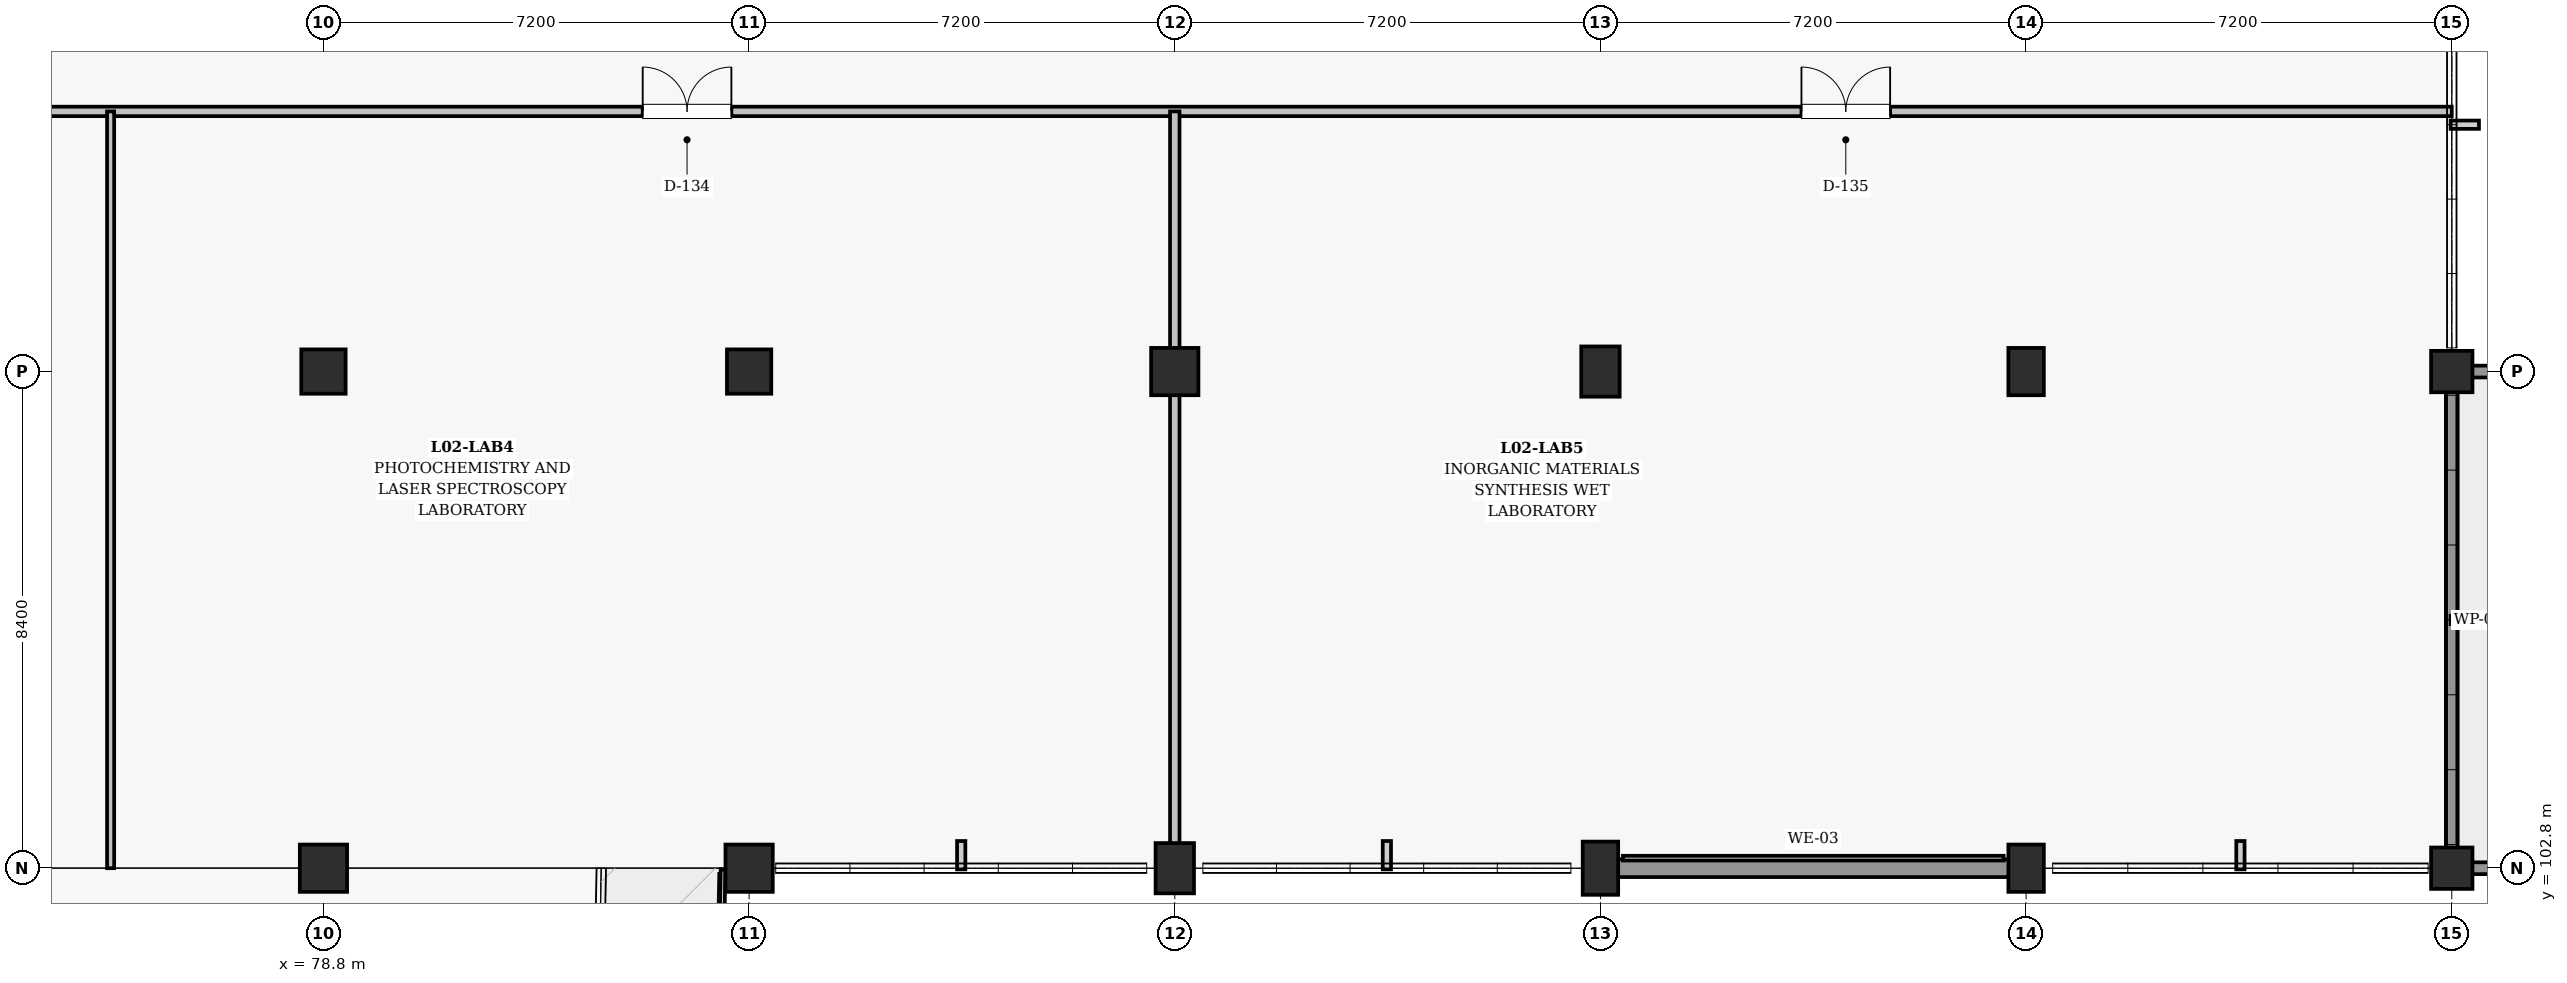
"""IFC4 building model, lengths in metres.
Left out: names, types, materials, properties, quantities, classifications, styles, units other than length and angle.
Written with IfcOpenShell. Run it as: python <this file> out.ifc"""

import sys

from ifc_helpers import new_model, si_unit, direction, frame, frame_2d, origin, origin_2d, place, context, subcontext, project, spatial, rectangle, extrude, element, fill, save


model = new_model("IFC4")
c1 = context("Model", 3, precision=1e-05, world=origin(), true_north=direction((0.0, 1.0)))
c2 = subcontext(c1, "Body", "Model", "MODEL_VIEW")
j1 = project(units=[si_unit("LENGTHUNIT", "METRE"), si_unit("PLANEANGLEUNIT", "RADIAN")], contexts=[c1])
p1 = place(None, origin())
s1 = spatial("IfcSite", under=j1, at=p1, CompositionType="ELEMENT")
p2 = place(p1, origin())
s2 = spatial("IfcBuilding", under=s1, at=p2, CompositionType="ELEMENT")
p3 = place(p2, frame((0.0, 0.0, 9.9)))
s3 = spatial("IfcBuildingStorey", under=s2, at=p3, CompositionType="ELEMENT", Elevation=9.9)
p4 = place(p3, frame((78.8, 102.8, 0.0), z_axis=(0.0, 0.0, 1.0), x_axis=(1.0, 0.0, 0.0)))
e1 = element("IfcColumn", 1, at=p4, inside=s3, PredefinedType="COLUMN", context=c2, shape_type="SweptSolid", body=[
    extrude(rectangle(XDim=0.8, YDim=0.8, at=origin_2d()), origin(), (0.0, 0.0, 1.0), 4.5),
])
p5 = place(p3, frame((78.8, 111.2, 0.0), z_axis=(0.0, 0.0, 1.0), x_axis=(1.0, 0.0, 0.0)))
e2 = element("IfcColumn", 2, at=p5, inside=s3, PredefinedType="COLUMN", context=c2, shape_type="SweptSolid", body=[
    extrude(rectangle(XDim=0.75, YDim=0.75, at=origin_2d()), origin(), (0.0, 0.0, 1.0), 4.5),
])
p6 = place(p3, frame((86.0, 102.8, 0.0), z_axis=(0.0, 0.0, 1.0), x_axis=(1.0, 0.0, 0.0)))
e3 = element("IfcColumn", 3, at=p6, inside=s3, PredefinedType="COLUMN", context=c2, shape_type="SweptSolid", body=[
    extrude(rectangle(XDim=0.8, YDim=0.8, at=origin_2d()), origin(), (0.0, 0.0, 1.0), 4.5),
])
p7 = place(p3, frame((86.0, 111.2, 0.0), z_axis=(0.0, 0.0, 1.0), x_axis=(1.0, 0.0, 0.0)))
e4 = element("IfcColumn", 4, at=p7, inside=s3, PredefinedType="COLUMN", context=c2, shape_type="SweptSolid", body=[
    extrude(rectangle(XDim=0.75, YDim=0.75, at=origin_2d()), origin(), (0.0, 0.0, 1.0), 4.5),
])
p8 = place(p3, frame((93.2, 102.8, 0.0), z_axis=(0.0, 0.0, 1.0), x_axis=(1.0, 0.0, 0.0)))
e5 = element("IfcColumn", 5, at=p8, inside=s3, PredefinedType="COLUMN", context=c2, shape_type="SweptSolid", body=[
    extrude(rectangle(XDim=0.65, YDim=0.85, at=origin_2d()), origin(), (0.0, 0.0, 1.0), 4.5),
])
p9 = place(p3, frame((93.2, 111.2, 0.0), z_axis=(0.0, 0.0, 1.0), x_axis=(1.0, 0.0, 0.0)))
e6 = element("IfcColumn", 6, at=p9, inside=s3, PredefinedType="COLUMN", context=c2, shape_type="SweptSolid", body=[
    extrude(rectangle(XDim=0.8, YDim=0.8, at=origin_2d()), origin(), (0.0, 0.0, 1.0), 4.5),
])
p10 = place(p3, frame((100.4, 102.8, 0.0), z_axis=(0.0, 0.0, 1.0), x_axis=(1.0, 0.0, 0.0)))
e7 = element("IfcColumn", 7, at=p10, inside=s3, PredefinedType="COLUMN", context=c2, shape_type="SweptSolid", body=[
    extrude(rectangle(XDim=0.6, YDim=0.9, at=origin_2d()), origin(), (0.0, 0.0, 1.0), 4.5),
])
p11 = place(p3, frame((100.4, 111.2, 0.0), z_axis=(0.0, 0.0, 1.0), x_axis=(1.0, 0.0, 0.0)))
e8 = element("IfcColumn", 8, at=p11, inside=s3, PredefinedType="COLUMN", context=c2, shape_type="SweptSolid", body=[
    extrude(rectangle(XDim=0.65, YDim=0.85, at=origin_2d()), origin(), (0.0, 0.0, 1.0), 4.5),
])
for number, where, z_axis, x_axis in (
    (9, (107.6, 102.8, 0.0), (0.0, 0.0, 1.0), (1.0, 0.0, 0.0)),
    (10, (107.6, 111.2, 0.0), (0.0, 0.0, 1.0), (1.0, 0.0, 0.0)),
):
    element("IfcColumn", number, at=place(p3, frame(where, z_axis=z_axis, x_axis=x_axis)), inside=s3, PredefinedType="COLUMN", context=c2, shape_type="SweptSolid", body=[
        extrude(rectangle(XDim=0.6, YDim=0.8, at=origin_2d()), origin(), (0.0, 0.0, 1.0), 4.5),
    ])
for number, where, z_axis, x_axis in (
    (11, (114.8, 102.8, 0.0), (0.0, 0.0, 1.0), (1.0, 0.0, 0.0)),
    (12, (114.8, 111.2, 0.0), (0.0, 0.0, 1.0), (1.0, 0.0, 0.0)),
):
    element("IfcColumn", number, at=place(p3, frame(where, z_axis=z_axis, x_axis=x_axis)), inside=s3, PredefinedType="COLUMN", context=c2, shape_type="SweptSolid", body=[
        extrude(rectangle(XDim=0.7, YDim=0.7, at=origin_2d()), origin(), (0.0, 0.0, 1.0), 4.5),
    ])
p12 = place(p3, frame((100.68, 102.8, 0.0), z_axis=(0.0, 0.0, 1.0), x_axis=(1.0, 0.0, 0.0)))
e13 = element("IfcWall", 13, at=p12, inside=s3, PredefinedType="SOLIDWALL", context=c2, shape_type="SweptSolid", body=[
    extrude(rectangle(XDim=6.64, YDim=0.3, at=frame_2d((3.32, 0.0))), origin(), (0.0, 0.0, 1.0), 2.955),
])
for number, where, z_axis, x_axis in (
    (14, (114.8, 102.8, 0.0), (0.0, 0.0, 1.0), (1.0, 0.0, 0.0)),
    (15, (182.0, 111.2, 0.0), (0.0, 0.0, 1.0), (-1.0, 0.0, 0.0)),
):
    element("IfcWall", number, at=place(p3, frame(where, z_axis=z_axis, x_axis=x_axis)), inside=s3, PredefinedType="PARAPET", context=c2, shape_type="SweptSolid", body=[
        extrude(rectangle(XDim=67.2, YDim=0.2, at=frame_2d((33.6, 0.0))), origin(), (0.0, 0.0, 1.0), 0.95),
    ])
p13 = place(p3, frame((114.8, 111.2, 0.0), z_axis=(0.0, 0.0, 1.0), x_axis=(0.0, -1.0, 0.0)))
e16 = element("IfcWall", 16, at=p13, inside=s3, PredefinedType="PARAPET", context=c2, shape_type="SweptSolid", body=[
    extrude(rectangle(XDim=8.4, YDim=0.2, at=frame_2d((4.2, 0.0))), origin(), (0.0, 0.0, 1.0), 0.95),
])
p14 = place(p3, frame((14.0, 115.6, 0.0), z_axis=(0.0, 0.0, 1.0), x_axis=(1.0, 0.0, 0.0)))
e17 = element("IfcWall", 17, at=p14, inside=s3, PredefinedType="PARTITIONING", context=c2, shape_type="SweptSolid", body=[
    extrude(rectangle(XDim=100.8, YDim=0.16, at=frame_2d((50.4, 0.0))), origin(), (0.0, 0.0, 1.0), 2.96),
])
p15 = place(p14, frame((29.9, 0.0, 0.0)))
e18 = element("IfcOpeningElement", 18, at=p15, cuts=e17, PredefinedType="OPENING", context=c2, shape_type="SweptSolid", body=[
    extrude(rectangle(XDim=1.18, YDim=2.2, at=frame_2d((0.59, 1.1))), frame((0.0, 0.09, 0.0), z_axis=(0.0, -1.0, 0.0), x_axis=(1.0, 0.0, 0.0)), (0.0, 0.0, 1.0), 0.18),
])
p16 = place(p14, frame((8.3, 0.0, 0.0)))
e19 = element("IfcOpeningElement", 19, at=p16, cuts=e17, PredefinedType="OPENING", context=c2, shape_type="SweptSolid", body=[
    extrude(rectangle(XDim=1.5, YDim=2.25, at=frame_2d((0.75, 1.125))), frame((0.0, 0.09, 0.0), z_axis=(0.0, -1.0, 0.0), x_axis=(1.0, 0.0, 0.0)), (0.0, 0.0, 1.0), 0.18),
])
p17 = place(p14, frame((24.7, 0.0, 0.0)))
e20 = element("IfcOpeningElement", 20, at=p17, cuts=e17, PredefinedType="OPENING", context=c2, shape_type="SweptSolid", body=[
    extrude(rectangle(XDim=1.5, YDim=2.25, at=frame_2d((0.75, 1.125))), frame((0.0, 0.09, 0.0), z_axis=(0.0, -1.0, 0.0), x_axis=(1.0, 0.0, 0.0)), (0.0, 0.0, 1.0), 0.18),
])
p18 = place(p14, frame((46.6, 0.0, 0.0)))
e21 = element("IfcOpeningElement", 21, at=p18, cuts=e17, PredefinedType="OPENING", context=c2, shape_type="SweptSolid", body=[
    extrude(rectangle(XDim=1.45, YDim=2.2, at=frame_2d((0.725, 1.1))), frame((0.0, 0.09, 0.0), z_axis=(0.0, -1.0, 0.0), x_axis=(1.0, 0.0, 0.0)), (0.0, 0.0, 1.0), 0.18),
])
p19 = place(p14, frame((70.2, 0.0, 0.0)))
e22 = element("IfcOpeningElement", 22, at=p19, cuts=e17, PredefinedType="OPENING", context=c2, shape_type="SweptSolid", body=[
    extrude(rectangle(XDim=1.5, YDim=2.25, at=frame_2d((0.75, 1.125))), frame((0.0, 0.09, 0.0), z_axis=(0.0, -1.0, 0.0), x_axis=(1.0, 0.0, 0.0)), (0.0, 0.0, 1.0), 0.18),
])
p20 = place(p14, frame((89.8, 0.0, 0.0)))
e23 = element("IfcOpeningElement", 23, at=p20, cuts=e17, PredefinedType="OPENING", context=c2, shape_type="SweptSolid", body=[
    extrude(rectangle(XDim=1.5, YDim=2.25, at=frame_2d((0.75, 1.125))), frame((0.0, 0.09, 0.0), z_axis=(0.0, -1.0, 0.0), x_axis=(1.0, 0.0, 0.0)), (0.0, 0.0, 1.0), 0.18),
])
p21 = place(p3, frame((75.2, 102.8, 0.0), z_axis=(0.0, 0.0, 1.0), x_axis=(0.0, 1.0, 0.0)))
e24 = element("IfcWall", 24, at=p21, inside=s3, PredefinedType="PARTITIONING", context=c2, shape_type="SweptSolid", body=[
    extrude(rectangle(XDim=12.8, YDim=0.12, at=frame_2d((6.4, 0.0))), origin(), (0.0, 0.0, 1.0), 3.36),
])
p22 = place(p3, frame((93.2, 102.8, 0.0), z_axis=(0.0, 0.0, 1.0), x_axis=(0.0, 1.0, 0.0)))
e25 = element("IfcWall", 25, at=p22, inside=s3, PredefinedType="PARTITIONING", context=c2, shape_type="SweptSolid", body=[
    extrude(rectangle(XDim=12.8, YDim=0.16, at=frame_2d((6.4, 0.0))), origin(), (0.0, 0.0, 1.0), 3.36),
])
p23 = place(p19, origin())
e26 = element("IfcDoor", 26, at=p23, inside=s3, OperationType="DOUBLE_DOOR_SINGLE_SWING", PredefinedType="DOOR", context=c2, shape_type="SweptSolid", body=[
    extrude(rectangle(XDim=1.5, YDim=2.25, at=frame_2d((0.75, 1.125))), frame((0.0, 0.025, 0.0), z_axis=(0.0, -1.0, 0.0), x_axis=(1.0, 0.0, 0.0)), (0.0, 0.0, 1.0), 0.05),
])
fill(e22, e26)
p24 = place(p20, origin())
e27 = element("IfcDoor", 27, at=p24, inside=s3, OperationType="DOUBLE_DOOR_SINGLE_SWING", PredefinedType="DOOR", context=c2, shape_type="SweptSolid", body=[
    extrude(rectangle(XDim=1.5, YDim=2.25, at=frame_2d((0.75, 1.125))), frame((0.0, 0.025, 0.0), z_axis=(0.0, -1.0, 0.0), x_axis=(1.0, 0.0, 0.0)), (0.0, 0.0, 1.0), 0.05),
])
fill(e23, e27)
save(model, sys.argv[1])
